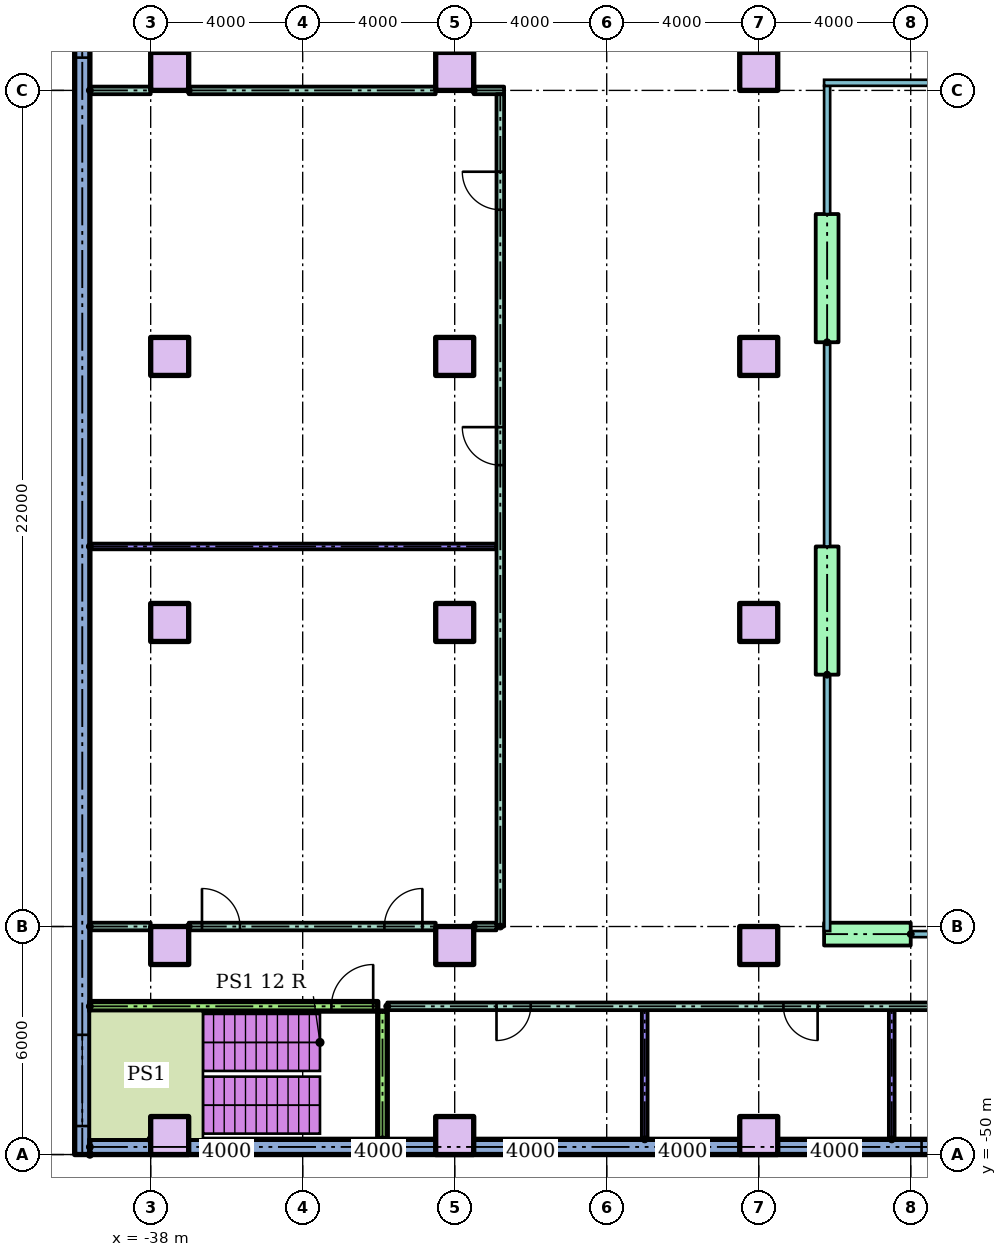
"""IFC4 building model, lengths in metres.
Left out: names, types, materials, properties, quantities, classifications, styles, units other than length and angle.
Written with IfcOpenShell. Run it as: python <this file> out.ifc"""

import sys

from ifc_helpers import new_model, si_unit, direction, frame, frame_2d, origin, origin_2d, place, context, subcontext, project, spatial, rectangle, extrude, element, fill, save


model = new_model("IFC4")
c1 = context("Model", 3, precision=1e-05, world=origin(), true_north=direction((0.0, 1.0)))
c2 = subcontext(c1, "Body", "Model", "MODEL_VIEW")
j1 = project(units=[si_unit("LENGTHUNIT", "METRE"), si_unit("PLANEANGLEUNIT", "RADIAN")], contexts=[c1])
p1 = place(None, origin())
s1 = spatial("IfcSite", under=j1, at=p1, CompositionType="ELEMENT")
p2 = place(p1, origin())
s2 = spatial("IfcBuilding", under=s1, at=p2, CompositionType="ELEMENT")
p3 = place(p2, frame((0.0, 0.0, 14.0)))
s3 = spatial("IfcBuildingStorey", under=s2, at=p3, CompositionType="ELEMENT", Elevation=14.0)
for number, where in (
    (1, (-37.5, -49.5, 0.0)),
    (2, (-30.0, -49.5, 0.0)),
    (3, (-22.0, -49.5, 0.0)),
    (4, (-37.5, -44.5, 0.0)),
    (5, (-30.0, -44.5, 0.0)),
    (6, (-22.0, -44.5, 0.0)),
    (7, (-37.5, -36.0, 0.0)),
    (8, (-30.0, -36.0, 0.0)),
    (9, (-22.0, -36.0, 0.0)),
    (10, (-37.5, -29.0, 0.0)),
    (11, (-30.0, -29.0, 0.0)),
    (12, (-22.0, -29.0, 0.0)),
    (13, (-37.5, -21.5, 0.0)),
    (14, (-30.0, -21.5, 0.0)),
    (15, (-22.0, -21.5, 0.0)),
):
    element("IfcColumn", number, at=place(p3, frame(where)), inside=s3, PredefinedType="COLUMN", context=c2, shape_type="SweptSolid", body=[
        extrude(rectangle(XDim=1.0, YDim=1.0, at=origin_2d()), origin(), (0.0, 0.0, 1.0), 4.0),
    ])
p4 = place(p3, frame((-39.8, 20.0, 0.0), z_axis=(0.0, 0.0, 1.0), x_axis=(0.0, -1.0, 0.0)))
e16 = element("IfcWall", 16, at=p4, inside=s3, PredefinedType="STANDARD", context=c2, shape_type="SweptSolid", body=[
    extrude(rectangle(XDim=70.0, YDim=0.4, at=frame_2d((35.0, 0.0))), origin(), (0.0, 0.0, 1.0), 3.7),
])
p5 = place(p4, frame((1.05, 0.0, 0.9)))
e17 = element("IfcOpeningElement", 17, at=p5, cuts=e16, PredefinedType="OPENING", context=c2, shape_type="SweptSolid", body=[
    extrude(rectangle(XDim=2.4, YDim=2.1, at=frame_2d((1.2, 1.05))), frame((0.0, 0.21, 0.0), z_axis=(0.0, -1.0, 0.0), x_axis=(1.0, 0.0, 0.0)), (0.0, 0.0, 1.0), 0.42),
])
p6 = place(p4, frame((5.55, 0.0, 0.9)))
e18 = element("IfcOpeningElement", 18, at=p6, cuts=e16, PredefinedType="OPENING", context=c2, shape_type="SweptSolid", body=[
    extrude(rectangle(XDim=2.4, YDim=2.1, at=frame_2d((1.2, 1.05))), frame((0.0, 0.21, 0.0), z_axis=(0.0, -1.0, 0.0), x_axis=(1.0, 0.0, 0.0)), (0.0, 0.0, 1.0), 0.42),
])
p7 = place(p4, frame((9.863, 0.0, 0.9)))
e19 = element("IfcOpeningElement", 19, at=p7, cuts=e16, PredefinedType="OPENING", context=c2, shape_type="SweptSolid", body=[
    extrude(rectangle(XDim=2.4, YDim=2.1, at=frame_2d((1.2, 1.05))), frame((0.0, 0.21, 0.0), z_axis=(0.0, -1.0, 0.0), x_axis=(1.0, 0.0, 0.0)), (0.0, 0.0, 1.0), 0.42),
])
p8 = place(p4, frame((13.988, 0.0, 0.9)))
e20 = element("IfcOpeningElement", 20, at=p8, cuts=e16, PredefinedType="OPENING", context=c2, shape_type="SweptSolid", body=[
    extrude(rectangle(XDim=2.4, YDim=2.1, at=frame_2d((1.2, 1.05))), frame((0.0, 0.21, 0.0), z_axis=(0.0, -1.0, 0.0), x_axis=(1.0, 0.0, 0.0)), (0.0, 0.0, 1.0), 0.42),
])
p9 = place(p4, frame((18.113, 0.0, 0.9)))
e21 = element("IfcOpeningElement", 21, at=p9, cuts=e16, PredefinedType="OPENING", context=c2, shape_type="SweptSolid", body=[
    extrude(rectangle(XDim=2.4, YDim=2.1, at=frame_2d((1.2, 1.05))), frame((0.0, 0.21, 0.0), z_axis=(0.0, -1.0, 0.0), x_axis=(1.0, 0.0, 0.0)), (0.0, 0.0, 1.0), 0.42),
])
p10 = place(p4, frame((22.238, 0.0, 0.9)))
e22 = element("IfcOpeningElement", 22, at=p10, cuts=e16, PredefinedType="OPENING", context=c2, shape_type="SweptSolid", body=[
    extrude(rectangle(XDim=2.4, YDim=2.1, at=frame_2d((1.2, 1.05))), frame((0.0, 0.21, 0.0), z_axis=(0.0, -1.0, 0.0), x_axis=(1.0, 0.0, 0.0)), (0.0, 0.0, 1.0), 0.42),
])
p11 = place(p4, frame((26.363, 0.0, 0.9)))
e23 = element("IfcOpeningElement", 23, at=p11, cuts=e16, PredefinedType="OPENING", context=c2, shape_type="SweptSolid", body=[
    extrude(rectangle(XDim=2.4, YDim=2.1, at=frame_2d((1.2, 1.05))), frame((0.0, 0.21, 0.0), z_axis=(0.0, -1.0, 0.0), x_axis=(1.0, 0.0, 0.0)), (0.0, 0.0, 1.0), 0.42),
])
p12 = place(p4, frame((30.488, 0.0, 0.9)))
e24 = element("IfcOpeningElement", 24, at=p12, cuts=e16, PredefinedType="OPENING", context=c2, shape_type="SweptSolid", body=[
    extrude(rectangle(XDim=2.4, YDim=2.1, at=frame_2d((1.2, 1.05))), frame((0.0, 0.21, 0.0), z_axis=(0.0, -1.0, 0.0), x_axis=(1.0, 0.0, 0.0)), (0.0, 0.0, 1.0), 0.42),
])
p13 = place(p4, frame((34.613, 0.0, 0.9)))
e25 = element("IfcOpeningElement", 25, at=p13, cuts=e16, PredefinedType="OPENING", context=c2, shape_type="SweptSolid", body=[
    extrude(rectangle(XDim=2.4, YDim=2.1, at=frame_2d((1.2, 1.05))), frame((0.0, 0.21, 0.0), z_axis=(0.0, -1.0, 0.0), x_axis=(1.0, 0.0, 0.0)), (0.0, 0.0, 1.0), 0.42),
])
p14 = place(p4, frame((38.738, 0.0, 0.9)))
e26 = element("IfcOpeningElement", 26, at=p14, cuts=e16, PredefinedType="OPENING", context=c2, shape_type="SweptSolid", body=[
    extrude(rectangle(XDim=2.4, YDim=2.1, at=frame_2d((1.2, 1.05))), frame((0.0, 0.21, 0.0), z_axis=(0.0, -1.0, 0.0), x_axis=(1.0, 0.0, 0.0)), (0.0, 0.0, 1.0), 0.42),
])
p15 = place(p4, frame((66.85, 0.0, 0.9)))
e27 = element("IfcOpeningElement", 27, at=p15, cuts=e16, PredefinedType="OPENING", context=c2, shape_type="SweptSolid", body=[
    extrude(rectangle(XDim=2.4, YDim=2.1, at=frame_2d((1.2, 1.05))), frame((0.0, 0.21, 0.0), z_axis=(0.0, -1.0, 0.0), x_axis=(1.0, 0.0, 0.0)), (0.0, 0.0, 1.0), 0.42),
])
p16 = place(p3, frame((-39.6, -49.8, 0.0)))
e28 = element("IfcWall", 28, at=p16, inside=s3, PredefinedType="STANDARD", context=c2, shape_type="SweptSolid", body=[
    extrude(rectangle(XDim=79.2, YDim=0.4, at=frame_2d((39.6, 0.0))), origin(), (0.0, 0.0, 1.0), 3.7),
])
p17 = place(p16, frame((21.885, 0.0, 0.9)))
e29 = element("IfcOpeningElement", 29, at=p17, cuts=e28, PredefinedType="OPENING", context=c2, shape_type="SweptSolid", body=[
    extrude(rectangle(XDim=2.4, YDim=2.1, at=frame_2d((1.2, 1.05))), frame((0.0, 0.21, 0.0), z_axis=(0.0, -1.0, 0.0), x_axis=(1.0, 0.0, 0.0)), (0.0, 0.0, 1.0), 0.42),
])
p18 = place(p16, frame((30.135, 0.0, 0.9)))
e30 = element("IfcOpeningElement", 30, at=p18, cuts=e28, PredefinedType="OPENING", context=c2, shape_type="SweptSolid", body=[
    extrude(rectangle(XDim=2.05, YDim=2.1, at=frame_2d((1.025, 1.05))), frame((0.0, 0.21, 0.0), z_axis=(0.0, -1.0, 0.0), x_axis=(1.0, 0.0, 0.0)), (0.0, 0.0, 1.0), 0.42),
])
p19 = place(p16, frame((38.135, 0.0, 0.9)))
e31 = element("IfcOpeningElement", 31, at=p19, cuts=e28, PredefinedType="OPENING", context=c2, shape_type="SweptSolid", body=[
    extrude(rectangle(XDim=2.4, YDim=2.1, at=frame_2d((1.2, 1.05))), frame((0.0, 0.21, 0.0), z_axis=(0.0, -1.0, 0.0), x_axis=(1.0, 0.0, 0.0)), (0.0, 0.0, 1.0), 0.42),
])
p20 = place(p16, frame((47.015, 0.0, 0.9)))
e32 = element("IfcOpeningElement", 32, at=p20, cuts=e28, PredefinedType="OPENING", context=c2, shape_type="SweptSolid", body=[
    extrude(rectangle(XDim=1.52, YDim=2.1, at=frame_2d((0.76, 1.05))), frame((0.0, 0.21, 0.0), z_axis=(0.0, -1.0, 0.0), x_axis=(1.0, 0.0, 0.0)), (0.0, 0.0, 1.0), 0.42),
])
p21 = place(p16, frame((54.135, 0.0, 0.9)))
e33 = element("IfcOpeningElement", 33, at=p21, cuts=e28, PredefinedType="OPENING", context=c2, shape_type="SweptSolid", body=[
    extrude(rectangle(XDim=2.4, YDim=2.1, at=frame_2d((1.2, 1.05))), frame((0.0, 0.21, 0.0), z_axis=(0.0, -1.0, 0.0), x_axis=(1.0, 0.0, 0.0)), (0.0, 0.0, 1.0), 0.42),
])
p22 = place(p3, frame((-18.0, -44.2, 0.0), z_axis=(0.0, 0.0, 1.0), x_axis=(-1.0, 0.0, 0.0)))
e34 = element("IfcWall", 34, at=p22, inside=s3, PredefinedType="STANDARD", context=c2, shape_type="SweptSolid", body=[
    extrude(rectangle(XDim=2.28, YDim=0.6, at=frame_2d((1.14, 0.0))), origin(), (0.0, 0.0, 1.0), 3.7),
])
for number, where, z_axis, x_axis in (
    (35, (-20.2, -37.373, 0.0), (0.0, 0.0, 1.0), (0.0, 1.0, 0.0)),
    (36, (-20.2, -28.627, 0.0), (0.0, 0.0, 1.0), (0.0, 1.0, 0.0)),
):
    element("IfcWall", number, at=place(p3, frame(where, z_axis=z_axis, x_axis=x_axis)), inside=s3, PredefinedType="STANDARD", context=c2, shape_type="SweptSolid", body=[
        extrude(rectangle(XDim=3.373, YDim=0.6, at=frame_2d((1.687, 0.0))), origin(), (0.0, 0.0, 1.0), 3.7),
    ])
p23 = place(p3, frame((-31.775, -46.1, 0.0)))
e37 = element("IfcWall", 37, at=p23, inside=s3, PredefinedType="PARTITIONING", context=c2, shape_type="SweptSolid", body=[
    extrude(rectangle(XDim=19.65, YDim=0.2, at=frame_2d((9.825, 0.0))), origin(), (0.0, 0.0, 1.0), 3.7),
])
p24 = place(p23, frame((2.875, 0.0, 0.0)))
e38 = element("IfcOpeningElement", 38, at=p24, cuts=e37, PredefinedType="OPENING", context=c2, shape_type="SweptSolid", body=[
    extrude(rectangle(XDim=0.9, YDim=2.1, at=frame_2d((0.45, 1.05))), frame((0.0, 0.11, 0.0), z_axis=(0.0, -1.0, 0.0), x_axis=(1.0, 0.0, 0.0)), (0.0, 0.0, 1.0), 0.22),
])
p25 = place(p23, frame((10.425, 0.0, 0.0)))
e39 = element("IfcOpeningElement", 39, at=p25, cuts=e37, PredefinedType="OPENING", context=c2, shape_type="SweptSolid", body=[
    extrude(rectangle(XDim=0.9, YDim=2.1, at=frame_2d((0.45, 1.05))), frame((0.0, 0.11, 0.0), z_axis=(0.0, -1.0, 0.0), x_axis=(1.0, 0.0, 0.0)), (0.0, 0.0, 1.0), 0.22),
])
p26 = place(p23, frame((16.075, 0.0, 0.0)))
e40 = element("IfcOpeningElement", 40, at=p26, cuts=e37, PredefinedType="OPENING", context=c2, shape_type="SweptSolid", body=[
    extrude(rectangle(XDim=0.9, YDim=2.1, at=frame_2d((0.45, 1.05))), frame((0.0, 0.11, 0.0), z_axis=(0.0, -1.0, 0.0), x_axis=(1.0, 0.0, 0.0)), (0.0, 0.0, 1.0), 0.22),
])
p27 = place(p3, frame((-39.6, -46.1, 0.0)))
e41 = element("IfcWall", 41, at=p27, inside=s3, PredefinedType="SOLIDWALL", context=c2, shape_type="SweptSolid", body=[
    extrude(rectangle(XDim=7.575, YDim=0.25, at=frame_2d((3.788, 0.0))), origin(), (0.0, 0.0, 1.0), 3.7),
])
p28 = place(p27, frame((6.355, 0.0, 0.0)))
e42 = element("IfcOpeningElement", 42, at=p28, cuts=e41, PredefinedType="OPENING", context=c2, shape_type="SweptSolid", body=[
    extrude(rectangle(XDim=1.1, YDim=2.1, at=frame_2d((0.55, 1.05))), frame((0.0, 0.135, 0.0), z_axis=(0.0, -1.0, 0.0), x_axis=(1.0, 0.0, 0.0)), (0.0, 0.0, 1.0), 0.27),
])
p29 = place(p3, frame((-39.6, -44.0, 0.0)))
e43 = element("IfcWall", 43, at=p29, inside=s3, PredefinedType="PARTITIONING", context=c2, shape_type="SweptSolid", body=[
    extrude(rectangle(XDim=1.6, YDim=0.2, at=frame_2d((0.8, 0.0))), origin(), (0.0, 0.0, 1.0), 3.7),
])
p30 = place(p3, frame((-37.0, -44.0, 0.0)))
e44 = element("IfcWall", 44, at=p30, inside=s3, PredefinedType="PARTITIONING", context=c2, shape_type="SweptSolid", body=[
    extrude(rectangle(XDim=6.5, YDim=0.2, at=frame_2d((3.25, 0.0))), origin(), (0.0, 0.0, 1.0), 3.7),
])
p31 = place(p30, frame((0.35, 0.0, 0.0)))
e45 = element("IfcOpeningElement", 45, at=p31, cuts=e44, PredefinedType="OPENING", context=c2, shape_type="SweptSolid", body=[
    extrude(rectangle(XDim=1.0, YDim=2.1, at=frame_2d((0.5, 1.05))), frame((0.0, 0.11, 0.0), z_axis=(0.0, -1.0, 0.0), x_axis=(1.0, 0.0, 0.0)), (0.0, 0.0, 1.0), 0.22),
])
p32 = place(p30, frame((5.15, 0.0, 0.0)))
e46 = element("IfcOpeningElement", 46, at=p32, cuts=e44, PredefinedType="OPENING", context=c2, shape_type="SweptSolid", body=[
    extrude(rectangle(XDim=1.0, YDim=2.1, at=frame_2d((0.5, 1.05))), frame((0.0, 0.11, 0.0), z_axis=(0.0, -1.0, 0.0), x_axis=(1.0, 0.0, 0.0)), (0.0, 0.0, 1.0), 0.22),
])
p33 = place(p3, frame((-29.5, -44.0, 0.0)))
e47 = element("IfcWall", 47, at=p33, inside=s3, PredefinedType="PARTITIONING", context=c2, shape_type="SweptSolid", body=[
    extrude(rectangle(XDim=0.6, YDim=0.2, at=frame_2d((0.3, 0.0))), origin(), (0.0, 0.0, 1.0), 3.7),
])
p34 = place(p3, frame((-39.6, -34.0, 0.0)))
e48 = element("IfcWall", 48, at=p34, inside=s3, PredefinedType="PARTITIONING", context=c2, shape_type="SweptSolid", body=[
    extrude(rectangle(XDim=10.7, YDim=0.15, at=frame_2d((5.35, 0.0))), origin(), (0.0, 0.0, 1.0), 3.7),
])
p35 = place(p3, frame((-39.6, -22.0, 0.0)))
e49 = element("IfcWall", 49, at=p35, inside=s3, PredefinedType="PARTITIONING", context=c2, shape_type="SweptSolid", body=[
    extrude(rectangle(XDim=1.6, YDim=0.2, at=frame_2d((0.8, 0.0))), origin(), (0.0, 0.0, 1.0), 3.7),
])
p36 = place(p3, frame((-37.0, -22.0, 0.0)))
e50 = element("IfcWall", 50, at=p36, inside=s3, PredefinedType="PARTITIONING", context=c2, shape_type="SweptSolid", body=[
    extrude(rectangle(XDim=6.5, YDim=0.2, at=frame_2d((3.25, 0.0))), origin(), (0.0, 0.0, 1.0), 3.7),
])
p37 = place(p3, frame((-29.5, -22.0, 0.0)))
e51 = element("IfcWall", 51, at=p37, inside=s3, PredefinedType="PARTITIONING", context=c2, shape_type="SweptSolid", body=[
    extrude(rectangle(XDim=0.8, YDim=0.2, at=frame_2d((0.4, 0.0))), origin(), (0.0, 0.0, 1.0), 3.7),
])
p38 = place(p3, frame((-31.9, -49.6, 0.0), z_axis=(0.0, 0.0, 1.0), x_axis=(0.0, 1.0, 0.0)))
e52 = element("IfcWall", 52, at=p38, inside=s3, PredefinedType="SOLIDWALL", context=c2, shape_type="SweptSolid", body=[
    extrude(rectangle(XDim=3.375, YDim=0.25, at=frame_2d((1.688, 0.0))), origin(), (0.0, 0.0, 1.0), 3.7),
])
p39 = place(p3, frame((-28.8, -44.0, 0.0), z_axis=(0.0, 0.0, 1.0), x_axis=(0.0, 1.0, 0.0)))
e53 = element("IfcWall", 53, at=p39, inside=s3, PredefinedType="PARTITIONING", context=c2, shape_type="SweptSolid", body=[
    extrude(rectangle(XDim=21.9, YDim=0.2, at=frame_2d((10.95, 0.0))), origin(), (0.0, 0.0, 1.0), 3.7),
])
p40 = place(p39, frame((12.14, 0.0, 0.0)))
e54 = element("IfcOpeningElement", 54, at=p40, cuts=e53, PredefinedType="OPENING", context=c2, shape_type="SweptSolid", body=[
    extrude(rectangle(XDim=1.0, YDim=2.1, at=frame_2d((0.5, 1.05))), frame((0.0, 0.11, 0.0), z_axis=(0.0, -1.0, 0.0), x_axis=(1.0, 0.0, 0.0)), (0.0, 0.0, 1.0), 0.22),
])
p41 = place(p39, frame((18.86, 0.0, 0.0)))
e55 = element("IfcOpeningElement", 55, at=p41, cuts=e53, PredefinedType="OPENING", context=c2, shape_type="SweptSolid", body=[
    extrude(rectangle(XDim=1.0, YDim=2.1, at=frame_2d((0.5, 1.05))), frame((0.0, 0.11, 0.0), z_axis=(0.0, -1.0, 0.0), x_axis=(1.0, 0.0, 0.0)), (0.0, 0.0, 1.0), 0.22),
])
for number, where, z_axis, x_axis in (
    (56, (-25.0, -49.6, 0.0), (0.0, 0.0, 1.0), (0.0, 1.0, 0.0)),
    (57, (-18.5, -49.6, 0.0), (0.0, 0.0, 1.0), (0.0, 1.0, 0.0)),
):
    element("IfcWall", number, at=place(p3, frame(where, z_axis=z_axis, x_axis=x_axis)), inside=s3, PredefinedType="PARTITIONING", context=c2, shape_type="SweptSolid", body=[
        extrude(rectangle(XDim=3.4, YDim=0.15, at=frame_2d((1.7, 0.0))), origin(), (0.0, 0.0, 1.0), 3.7),
    ])
p42 = place(p14, origin())
e58 = element("IfcWindow", 58, at=p42, inside=s3, PartitioningType="SINGLE_PANEL", PredefinedType="WINDOW", context=c2, shape_type="SweptSolid", body=[
    extrude(rectangle(XDim=2.4, YDim=2.1, at=frame_2d((1.2, 1.05))), frame((0.0, 0.03, 0.0), z_axis=(0.0, -1.0, 0.0), x_axis=(1.0, 0.0, 0.0)), (0.0, 0.0, 1.0), 0.06),
])
fill(e26, e58)
p43 = place(p15, origin())
e59 = element("IfcWindow", 59, at=p43, inside=s3, PartitioningType="SINGLE_PANEL", PredefinedType="WINDOW", context=c2, shape_type="SweptSolid", body=[
    extrude(rectangle(XDim=2.4, YDim=2.1, at=frame_2d((1.2, 1.05))), frame((0.0, 0.03, 0.0), z_axis=(0.0, -1.0, 0.0), x_axis=(1.0, 0.0, 0.0)), (0.0, 0.0, 1.0), 0.06),
])
fill(e27, e59)
p44 = place(p17, origin())
e60 = element("IfcWindow", 60, at=p44, inside=s3, PartitioningType="SINGLE_PANEL", PredefinedType="WINDOW", context=c2, shape_type="SweptSolid", body=[
    extrude(rectangle(XDim=2.4, YDim=2.1, at=frame_2d((1.2, 1.05))), frame((0.0, 0.03, 0.0), z_axis=(0.0, -1.0, 0.0), x_axis=(1.0, 0.0, 0.0)), (0.0, 0.0, 1.0), 0.06),
])
fill(e29, e60)
p45 = place(p31, origin())
e61 = element("IfcDoor", 61, at=p45, inside=s3, OperationType="SINGLE_SWING_LEFT", PredefinedType="DOOR", context=c2, shape_type="SweptSolid", body=[
    extrude(rectangle(XDim=1.0, YDim=2.1, at=frame_2d((0.5, 1.05))), frame((0.0, 0.025, 0.0), z_axis=(0.0, -1.0, 0.0), x_axis=(1.0, 0.0, 0.0)), (0.0, 0.0, 1.0), 0.05),
])
fill(e45, e61)
p46 = place(p32, origin())
e62 = element("IfcDoor", 62, at=p46, inside=s3, OperationType="SINGLE_SWING_RIGHT", PredefinedType="DOOR", context=c2, shape_type="SweptSolid", body=[
    extrude(rectangle(XDim=1.0, YDim=2.1, at=frame_2d((0.5, 1.05))), frame((0.0, 0.025, 0.0), z_axis=(0.0, -1.0, 0.0), x_axis=(1.0, 0.0, 0.0)), (0.0, 0.0, 1.0), 0.05),
])
fill(e46, e62)
p47 = place(p40, origin())
e63 = element("IfcDoor", 63, at=p47, inside=s3, OperationType="SINGLE_SWING_RIGHT", PredefinedType="DOOR", context=c2, shape_type="SweptSolid", body=[
    extrude(rectangle(XDim=1.0, YDim=2.1, at=frame_2d((0.5, 1.05))), frame((0.0, 0.025, 0.0), z_axis=(0.0, -1.0, 0.0), x_axis=(1.0, 0.0, 0.0)), (0.0, 0.0, 1.0), 0.05),
])
fill(e54, e63)
p48 = place(p41, origin())
e64 = element("IfcDoor", 64, at=p48, inside=s3, OperationType="SINGLE_SWING_RIGHT", PredefinedType="DOOR", context=c2, shape_type="SweptSolid", body=[
    extrude(rectangle(XDim=1.0, YDim=2.1, at=frame_2d((0.5, 1.05))), frame((0.0, 0.025, 0.0), z_axis=(0.0, -1.0, 0.0), x_axis=(1.0, 0.0, 0.0)), (0.0, 0.0, 1.0), 0.05),
])
fill(e55, e64)
p49 = place(p24, frame((0.9, 0.0, 0.0), z_axis=(0.0, 0.0, 1.0), x_axis=(-1.0, 0.0, 0.0)))
e65 = element("IfcDoor", 65, at=p49, inside=s3, OperationType="SINGLE_SWING_LEFT", PredefinedType="DOOR", context=c2, shape_type="SweptSolid", body=[
    extrude(rectangle(XDim=0.9, YDim=2.1, at=frame_2d((0.45, 1.05))), frame((0.0, 0.025, 0.0), z_axis=(0.0, -1.0, 0.0), x_axis=(1.0, 0.0, 0.0)), (0.0, 0.0, 1.0), 0.05),
])
fill(e38, e65)
p50 = place(p25, frame((0.9, 0.0, 0.0), z_axis=(0.0, 0.0, 1.0), x_axis=(-1.0, 0.0, 0.0)))
e66 = element("IfcDoor", 66, at=p50, inside=s3, OperationType="SINGLE_SWING_RIGHT", PredefinedType="DOOR", context=c2, shape_type="SweptSolid", body=[
    extrude(rectangle(XDim=0.9, YDim=2.1, at=frame_2d((0.45, 1.05))), frame((0.0, 0.025, 0.0), z_axis=(0.0, -1.0, 0.0), x_axis=(1.0, 0.0, 0.0)), (0.0, 0.0, 1.0), 0.05),
])
fill(e39, e66)
p51 = place(p28, origin())
e67 = element("IfcDoor", 67, at=p51, inside=s3, OperationType="SINGLE_SWING_RIGHT", PredefinedType="DOOR", context=c2, shape_type="SweptSolid", body=[
    extrude(rectangle(XDim=1.1, YDim=2.1, at=frame_2d((0.55, 1.05))), frame((0.0, 0.025, 0.0), z_axis=(0.0, -1.0, 0.0), x_axis=(1.0, 0.0, 0.0)), (0.0, 0.0, 1.0), 0.05),
])
fill(e42, e67)
save(model, sys.argv[1])
